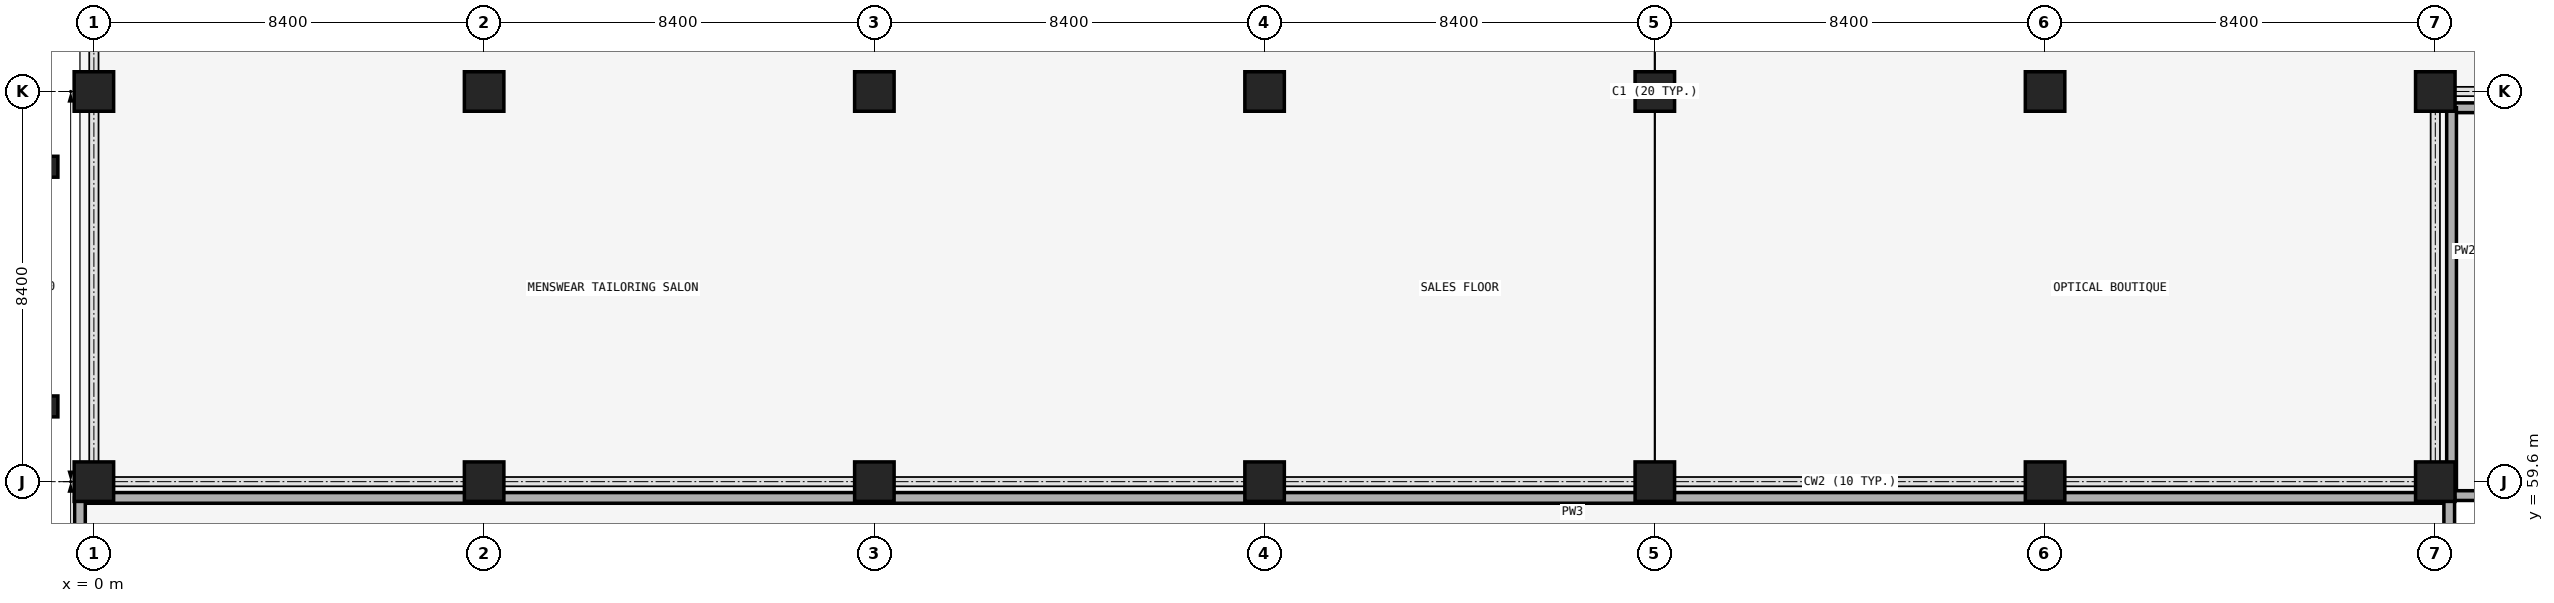
"""IFC4 building model, lengths in metres.
Left out: names, types, materials, properties, quantities, classifications, styles, units other than length and angle.
Written with IfcOpenShell. Run it as: python <this file> out.ifc"""

import sys

from ifc_helpers import new_model, si_unit, direction, frame, frame_2d, origin, origin_2d, place, context, subcontext, project, spatial, rectangle, extrude, element, save


model = new_model("IFC4")
c1 = context("Model", 3, precision=1e-05, world=origin(), true_north=direction((0.0, 1.0)))
c2 = subcontext(c1, "Body", "Model", "MODEL_VIEW")
j1 = project(units=[si_unit("LENGTHUNIT", "METRE"), si_unit("PLANEANGLEUNIT", "RADIAN")], contexts=[c1])
p1 = place(None, origin())
s1 = spatial("IfcSite", under=j1, at=p1, CompositionType="ELEMENT")
p2 = place(p1, origin())
s2 = spatial("IfcBuilding", under=s1, at=p2, CompositionType="ELEMENT")
p3 = place(p2, frame((0.0, 0.0, 9.9)))
s3 = spatial("IfcBuildingStorey", under=s2, at=p3, CompositionType="ELEMENT", Elevation=9.9)
for number, where, z_axis, x_axis in (
    (1, (0.0, 59.6, 0.0), (0.0, 0.0, 1.0), (1.0, 0.0, 0.0)),
    (2, (8.4, 59.6, 0.0), (0.0, 0.0, 1.0), (1.0, 0.0, 0.0)),
    (3, (16.8, 59.6, 0.0), (0.0, 0.0, 1.0), (1.0, 0.0, 0.0)),
    (4, (25.2, 59.6, 0.0), (0.0, 0.0, 1.0), (1.0, 0.0, 0.0)),
    (5, (33.6, 59.6, 0.0), (0.0, 0.0, 1.0), (1.0, 0.0, 0.0)),
    (6, (42.0, 59.6, 0.0), (0.0, 0.0, 1.0), (1.0, 0.0, 0.0)),
    (7, (50.4, 59.6, 0.0), (0.0, 0.0, 1.0), (1.0, 0.0, 0.0)),
    (8, (0.0, 68.0, 0.0), (0.0, 0.0, 1.0), (1.0, 0.0, 0.0)),
    (9, (8.4, 68.0, 0.0), (0.0, 0.0, 1.0), (1.0, 0.0, 0.0)),
    (10, (16.8, 68.0, 0.0), (0.0, 0.0, 1.0), (1.0, 0.0, 0.0)),
    (11, (25.2, 68.0, 0.0), (0.0, 0.0, 1.0), (1.0, 0.0, 0.0)),
    (12, (33.6, 68.0, 0.0), (0.0, 0.0, 1.0), (1.0, 0.0, 0.0)),
    (13, (42.0, 68.0, 0.0), (0.0, 0.0, 1.0), (1.0, 0.0, 0.0)),
    (14, (50.4, 68.0, 0.0), (0.0, 0.0, 1.0), (1.0, 0.0, 0.0)),
):
    element("IfcColumn", number, at=place(p3, frame(where, z_axis=z_axis, x_axis=x_axis)), inside=s3, PredefinedType="COLUMN", context=c2, shape_type="SweptSolid", body=[
        extrude(rectangle(XDim=0.85, YDim=0.85, at=origin_2d()), origin(), (0.0, 0.0, 1.0), 4.5),
    ])
for number, where, z_axis, x_axis in (
    (15, (-1.05, 61.22, 0.0), (0.0, 0.0, 1.0), (0.0, 1.0, 0.0)),
    (16, (-1.05, 66.38, 0.0), (0.0, 0.0, 1.0), (0.0, 1.0, 0.0)),
):
    element("IfcColumn", number, at=place(p3, frame(where, z_axis=z_axis, x_axis=x_axis)), inside=s3, PredefinedType="PILASTER", context=c2, shape_type="SweptSolid", body=[
        extrude(rectangle(XDim=0.45, YDim=0.55, at=origin_2d()), origin(), (0.0, 0.0, 1.0), 4.5),
    ])
p4 = place(p3, frame((67.5, 67.65, 0.0), z_axis=(0.0, 0.0, 1.0), x_axis=(-1.0, 0.0, 0.0)))
e17 = element("IfcWall", 17, at=p4, inside=s3, PredefinedType="PARAPET", context=c2, shape_type="SweptSolid", body=[
    extrude(rectangle(XDim=16.75, YDim=0.21, at=frame_2d((8.375, 0.0))), origin(), (0.0, 0.0, 1.0), 0.95),
])
p5 = place(p3, frame((50.75, 67.65, 0.0), z_axis=(0.0, 0.0, 1.0), x_axis=(0.0, -1.0, 0.0)))
e18 = element("IfcWall", 18, at=p5, inside=s3, PredefinedType="PARAPET", context=c2, shape_type="SweptSolid", body=[
    extrude(rectangle(XDim=8.35, YDim=0.21, at=frame_2d((4.175, 0.0))), origin(), (0.0, 0.0, 1.0), 0.95),
])
p6 = place(p3, frame((50.75, 59.3, 0.0), z_axis=(0.0, 0.0, 1.0), x_axis=(1.0, 0.0, 0.0)))
e19 = element("IfcWall", 19, at=p6, inside=s3, PredefinedType="PARAPET", context=c2, shape_type="SweptSolid", body=[
    extrude(rectangle(XDim=16.75, YDim=0.21, at=frame_2d((8.375, 0.0))), origin(), (0.0, 0.0, 1.0), 0.95),
])
p7 = place(p3, frame((50.7, 59.25, 0.0), z_axis=(0.0, 0.0, 1.0), x_axis=(-1.0, 0.0, 0.0)))
e20 = element("IfcWall", 20, at=p7, inside=s3, PredefinedType="PARAPET", context=c2, shape_type="SweptSolid", body=[
    extrude(rectangle(XDim=51.0, YDim=0.23, at=frame_2d((25.5, 0.0))), origin(), (0.0, 0.0, 1.0), 0.95),
])
for number, where, z_axis, x_axis in (
    (21, (-0.3, 59.25, 0.0), (0.0, 0.0, 1.0), (0.0, -1.0, 0.0)),
    (22, (50.7, 50.9, 0.0), (0.0, 0.0, 1.0), (0.0, 1.0, 0.0)),
):
    element("IfcWall", number, at=place(p3, frame(where, z_axis=z_axis, x_axis=x_axis)), inside=s3, PredefinedType="PARAPET", context=c2, shape_type="SweptSolid", body=[
        extrude(rectangle(XDim=8.35, YDim=0.23, at=frame_2d((4.175, 0.0))), origin(), (0.0, 0.0, 1.0), 0.95),
    ])
save(model, sys.argv[1])
